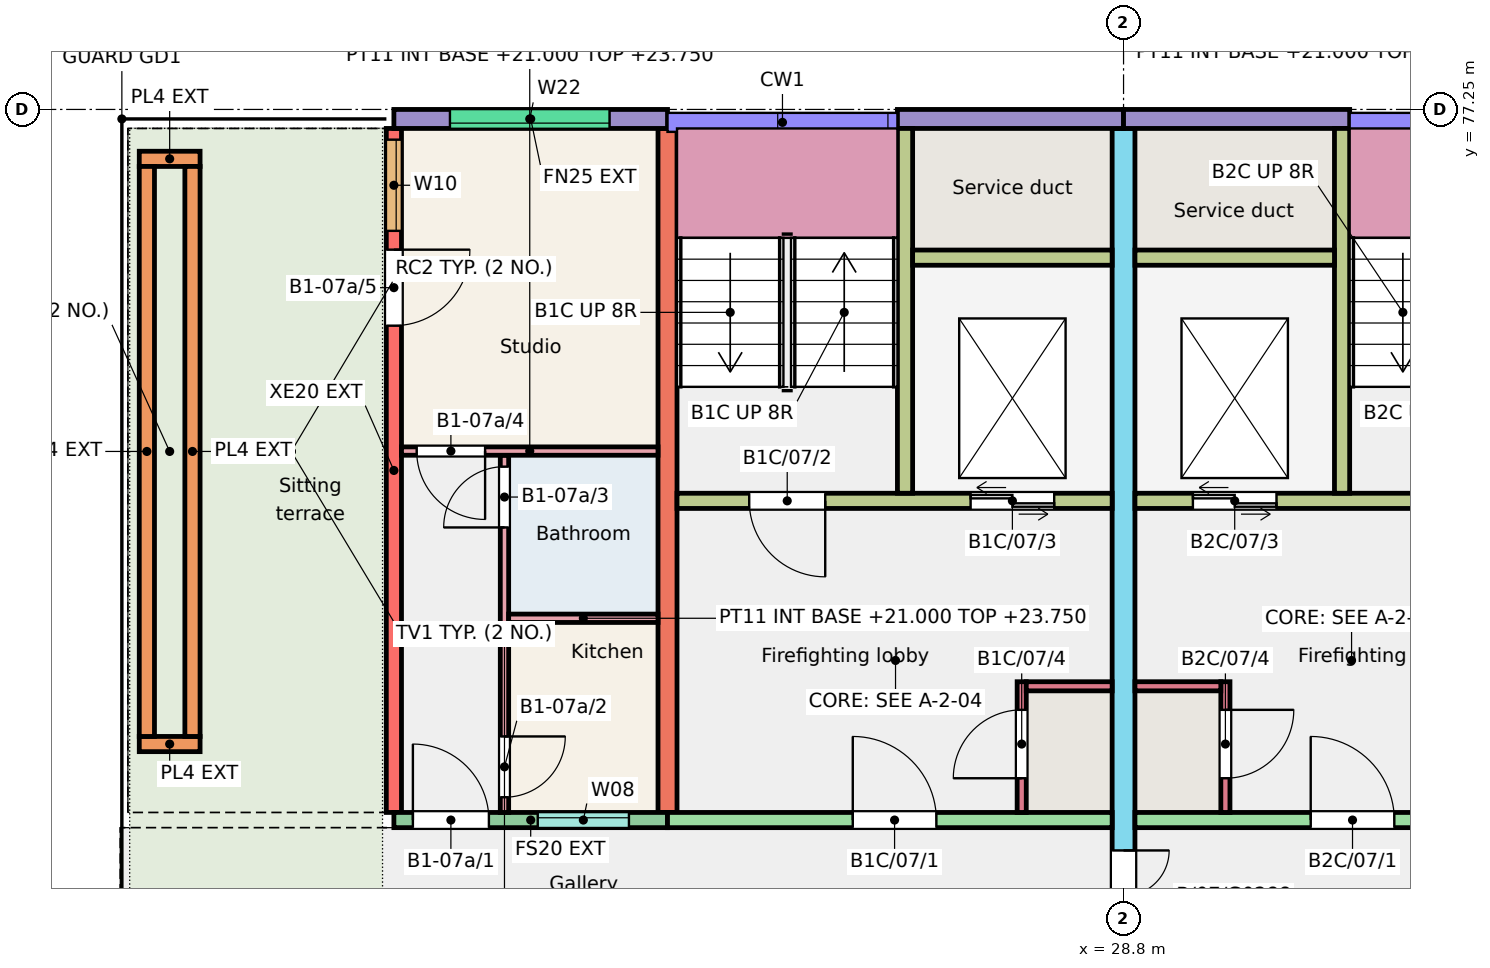
"""IFC4 building model, lengths in metres.
Left out: names, types, materials, properties, quantities, classifications, styles, units other than length and angle.
Written with IfcOpenShell. Run it as: python <this file> out.ifc"""

import sys

from ifc_helpers import new_model, si_unit, direction, frame, frame_2d, origin, place, context, subcontext, project, spatial, rectangle, extrude, element, fill, save


model = new_model("IFC4")
c1 = context("Model", 3, precision=1e-05, world=origin(), true_north=direction((0.0, 1.0)))
c2 = subcontext(c1, "Body", "Model", "MODEL_VIEW")
j1 = project(units=[si_unit("LENGTHUNIT", "METRE"), si_unit("PLANEANGLEUNIT", "RADIAN")], contexts=[c1])
p1 = place(None, origin())
s1 = spatial("IfcSite", under=j1, at=p1, CompositionType="ELEMENT")
p2 = place(p1, origin())
s2 = spatial("IfcBuilding", under=s1, at=p2, CompositionType="ELEMENT")
p3 = place(p2, frame((0.0, 0.0, 21.0)))
s3 = spatial("IfcBuildingStorey", under=s2, at=p3, CompositionType="ELEMENT", Elevation=21.0)
p4 = place(p3, frame((19.2, 68.0, 0.0), z_axis=(0.0, 0.0, 1.0), x_axis=(0.0, 1.0, 0.0)))
e1 = element("IfcWall", 1, at=p4, inside=s3, PredefinedType="SHEAR", context=c2, shape_type="SweptSolid", body=[
    extrude(rectangle(XDim=9.0, YDim=0.2, at=frame_2d((4.5, 0.0))), origin(), (0.0, 0.0, 1.0), 3.0),
])
p5 = place(p4, frame((7.653, 0.0, 0.9)))
e2 = element("IfcOpeningElement", 2, at=p5, cuts=e1, PredefinedType="OPENING", context=c2, shape_type="SweptSolid", body=[
    extrude(rectangle(XDim=1.2, YDim=1.5, at=frame_2d((0.6, 0.75))), frame((0.0, 0.11, 0.0), z_axis=(0.0, -1.0, 0.0), x_axis=(1.0, 0.0, 0.0)), (0.0, 0.0, 1.0), 0.22),
])
p6 = place(p4, frame((6.405, 0.0, 0.0)))
e3 = element("IfcOpeningElement", 3, at=p6, cuts=e1, PredefinedType="OPENING", context=c2, shape_type="SweptSolid", body=[
    extrude(rectangle(XDim=1.0, YDim=2.1, at=frame_2d((0.5, 1.05))), frame((0.0, 0.11, 0.0), z_axis=(0.0, -1.0, 0.0), x_axis=(1.0, 0.0, 0.0)), (0.0, 0.0, 1.0), 0.22),
])
p7 = place(p3, frame((22.8, 68.0, 0.0), z_axis=(0.0, 0.0, 1.0), x_axis=(0.0, 1.0, 0.0)))
e4 = element("IfcWall", 4, at=p7, inside=s3, PredefinedType="SHEAR", context=c2, shape_type="SweptSolid", body=[
    extrude(rectangle(XDim=9.0, YDim=0.25, at=frame_2d((4.5, 0.0))), origin(), (0.0, 0.0, 1.0), 3.0),
])
p8 = place(p3, frame((28.8, 66.0, 0.0), z_axis=(0.0, 0.0, 1.0), x_axis=(0.0, 1.0, 0.0)))
e5 = element("IfcWall", 5, at=p8, inside=s3, PredefinedType="SHEAR", context=c2, shape_type="SweptSolid", body=[
    extrude(rectangle(XDim=11.0, YDim=0.3, at=frame_2d((5.5, 0.0))), origin(), (0.0, 0.0, 1.0), 3.0),
])
p9 = place(p8, frame((0.3, 0.0, 0.0)))
e6 = element("IfcOpeningElement", 6, at=p9, cuts=e5, PredefinedType="OPENING", context=c2, shape_type="SweptSolid", body=[
    extrude(rectangle(XDim=1.2, YDim=2.1, at=frame_2d((0.6, 1.05))), frame((0.0, 0.16, 0.0), z_axis=(0.0, -1.0, 0.0), x_axis=(1.0, 0.0, 0.0)), (0.0, 0.0, 1.0), 0.32),
])
p10 = place(p3, frame((19.2, 77.125, 0.0), z_axis=(0.0, 0.0, 1.0), x_axis=(1.0, 0.0, 0.0)))
e7 = element("IfcWall", 7, at=p10, inside=s3, PredefinedType="SOLIDWALL", context=c2, shape_type="SweptSolid", body=[
    extrude(rectangle(XDim=3.6, YDim=0.25, at=frame_2d((1.8, 0.0))), origin(), (0.0, 0.0, 1.0), 3.0),
])
p11 = place(p10, frame((0.738, 0.0, 1.2)))
e8 = element("IfcOpeningElement", 8, at=p11, cuts=e7, PredefinedType="OPENING", context=c2, shape_type="SweptSolid", body=[
    extrude(rectangle(XDim=2.1, YDim=1.2, at=frame_2d((1.05, 0.6))), frame((0.0, 0.135, 0.0), z_axis=(0.0, -1.0, 0.0), x_axis=(1.0, 0.0, 0.0)), (0.0, 0.0, 1.0), 0.27),
])
p12 = place(p3, frame((19.2, 67.9, 0.0), z_axis=(0.0, 0.0, 1.0), x_axis=(1.0, 0.0, 0.0)))
e9 = element("IfcWall", 9, at=p12, inside=s3, PredefinedType="SOLIDWALL", context=c2, shape_type="SweptSolid", body=[
    extrude(rectangle(XDim=3.6, YDim=0.2, at=frame_2d((1.8, 0.0))), origin(), (0.0, 0.0, 1.0), 3.0),
])
p13 = place(p12, frame((1.893, 0.0, 1.1)))
e10 = element("IfcOpeningElement", 10, at=p13, cuts=e9, PredefinedType="OPENING", context=c2, shape_type="SweptSolid", body=[
    extrude(rectangle(XDim=1.2, YDim=1.3, at=frame_2d((0.6, 0.65))), frame((0.0, 0.11, 0.0), z_axis=(0.0, -1.0, 0.0), x_axis=(1.0, 0.0, 0.0)), (0.0, 0.0, 1.0), 0.22),
])
p14 = place(p12, frame((0.25, 0.0, 0.0)))
e11 = element("IfcOpeningElement", 11, at=p14, cuts=e9, PredefinedType="OPENING", context=c2, shape_type="SweptSolid", body=[
    extrude(rectangle(XDim=1.0, YDim=2.1, at=frame_2d((0.5, 1.05))), frame((0.0, 0.11, 0.0), z_axis=(0.0, -1.0, 0.0), x_axis=(1.0, 0.0, 0.0)), (0.0, 0.0, 1.0), 0.22),
])
p15 = place(p3, frame((25.825, 77.125, 0.0), z_axis=(0.0, 0.0, 1.0), x_axis=(1.0, 0.0, 0.0)))
e12 = element("IfcWall", 12, at=p15, inside=s3, PredefinedType="SOLIDWALL", context=c2, shape_type="SweptSolid", body=[
    extrude(rectangle(XDim=2.975, YDim=0.25, at=frame_2d((1.488, 0.0))), origin(), (0.0, 0.0, 1.0), 3.0),
])
p16 = place(p3, frame((22.8, 67.9, 0.0), z_axis=(0.0, 0.0, 1.0), x_axis=(1.0, 0.0, 0.0)))
e13 = element("IfcWall", 13, at=p16, inside=s3, PredefinedType="SHEAR", context=c2, shape_type="SweptSolid", body=[
    extrude(rectangle(XDim=5.85, YDim=0.2, at=frame_2d((2.925, 0.0))), origin(), (0.0, 0.0, 1.0), 3.0),
])
p17 = place(p16, frame((2.438, 0.0, 0.0)))
e14 = element("IfcOpeningElement", 14, at=p17, cuts=e13, PredefinedType="OPENING", context=c2, shape_type="SweptSolid", body=[
    extrude(rectangle(XDim=1.1, YDim=2.1, at=frame_2d((0.55, 1.05))), frame((0.0, 0.11, 0.0), z_axis=(0.0, -1.0, 0.0), x_axis=(1.0, 0.0, 0.0)), (0.0, 0.0, 1.0), 0.22),
])
p18 = place(p3, frame((22.925, 72.1, 0.0), z_axis=(0.0, 0.0, 1.0), x_axis=(1.0, 0.0, 0.0)))
e15 = element("IfcWall", 15, at=p18, inside=s3, PredefinedType="SHEAR", context=c2, shape_type="SweptSolid", body=[
    extrude(rectangle(XDim=5.725, YDim=0.2, at=frame_2d((2.862, 0.0))), origin(), (0.0, 0.0, 1.0), 3.0),
])
p19 = place(p18, frame((0.95, 0.0, 0.0)))
e16 = element("IfcOpeningElement", 16, at=p19, cuts=e15, PredefinedType="OPENING", context=c2, shape_type="SweptSolid", body=[
    extrude(rectangle(XDim=1.0, YDim=2.1, at=frame_2d((0.5, 1.05))), frame((0.0, 0.11, 0.0), z_axis=(0.0, -1.0, 0.0), x_axis=(1.0, 0.0, 0.0)), (0.0, 0.0, 1.0), 0.22),
])
p20 = place(p18, frame((3.863, 0.0, 0.0)))
e17 = element("IfcOpeningElement", 17, at=p20, cuts=e15, PredefinedType="OPENING", context=c2, shape_type="SweptSolid", body=[
    extrude(rectangle(XDim=1.1, YDim=2.1, at=frame_2d((0.55, 1.05))), frame((0.0, 0.11, 0.0), z_axis=(0.0, -1.0, 0.0), x_axis=(1.0, 0.0, 0.0)), (0.0, 0.0, 1.0), 0.22),
])
p21 = place(p3, frame((25.925, 72.2, 0.0), z_axis=(0.0, 0.0, 1.0), x_axis=(0.0, 1.0, 0.0)))
e18 = element("IfcWall", 18, at=p21, inside=s3, PredefinedType="SHEAR", context=c2, shape_type="SweptSolid", body=[
    extrude(rectangle(XDim=4.8, YDim=0.2, at=frame_2d((2.4, 0.0))), origin(), (0.0, 0.0, 1.0), 3.0),
])
p22 = place(p3, frame((26.025, 75.3, 0.0), z_axis=(0.0, 0.0, 1.0), x_axis=(1.0, 0.0, 0.0)))
e19 = element("IfcWall", 19, at=p22, inside=s3, PredefinedType="SHEAR", context=c2, shape_type="SweptSolid", body=[
    extrude(rectangle(XDim=2.625, YDim=0.2, at=frame_2d((1.312, 0.0))), origin(), (0.0, 0.0, 1.0), 3.0),
])
p23 = place(p3, frame((27.46, 68.0, 0.0), z_axis=(0.0, 0.0, 1.0), x_axis=(0.0, 1.0, 0.0)))
e20 = element("IfcWall", 20, at=p23, inside=s3, PredefinedType="SHEAR", context=c2, shape_type="SweptSolid", body=[
    extrude(rectangle(XDim=1.72, YDim=0.12, at=frame_2d((0.86, 0.0))), origin(), (0.0, 0.0, 1.0), 3.0),
])
p24 = place(p23, frame((0.45, 0.0, 0.0)))
e21 = element("IfcOpeningElement", 21, at=p24, cuts=e20, PredefinedType="OPENING", context=c2, shape_type="SweptSolid", body=[
    extrude(rectangle(XDim=0.9, YDim=2.1, at=frame_2d((0.45, 1.05))), frame((0.0, 0.07, 0.0), z_axis=(0.0, -1.0, 0.0), x_axis=(1.0, 0.0, 0.0)), (0.0, 0.0, 1.0), 0.14),
])
p25 = place(p3, frame((27.52, 69.66, 0.0), z_axis=(0.0, 0.0, 1.0), x_axis=(1.0, 0.0, 0.0)))
e22 = element("IfcWall", 22, at=p25, inside=s3, PredefinedType="SHEAR", context=c2, shape_type="SweptSolid", body=[
    extrude(rectangle(XDim=1.13, YDim=0.12, at=frame_2d((0.565, 0.0))), origin(), (0.0, 0.0, 1.0), 3.0),
])
p26 = place(p3, frame((28.8, 77.125, 0.0), z_axis=(0.0, 0.0, 1.0), x_axis=(1.0, 0.0, 0.0)))
e23 = element("IfcWall", 23, at=p26, inside=s3, PredefinedType="SOLIDWALL", context=c2, shape_type="SweptSolid", body=[
    extrude(rectangle(XDim=2.975, YDim=0.25, at=frame_2d((1.487, 0.0))), origin(), (0.0, 0.0, 1.0), 3.0),
])
p27 = place(p3, frame((28.95, 67.9, 0.0), z_axis=(0.0, 0.0, 1.0), x_axis=(1.0, 0.0, 0.0)))
e24 = element("IfcWall", 24, at=p27, inside=s3, PredefinedType="SHEAR", context=c2, shape_type="SweptSolid", body=[
    extrude(rectangle(XDim=5.85, YDim=0.2, at=frame_2d((2.925, 0.0))), origin(), (0.0, 0.0, 1.0), 3.0),
])
p28 = place(p27, frame((2.312, 0.0, 0.0)))
e25 = element("IfcOpeningElement", 25, at=p28, cuts=e24, PredefinedType="OPENING", context=c2, shape_type="SweptSolid", body=[
    extrude(rectangle(XDim=1.1, YDim=2.1, at=frame_2d((0.55, 1.05))), frame((0.0, 0.11, 0.0), z_axis=(0.0, -1.0, 0.0), x_axis=(1.0, 0.0, 0.0)), (0.0, 0.0, 1.0), 0.22),
])
p29 = place(p3, frame((28.95, 72.1, 0.0), z_axis=(0.0, 0.0, 1.0), x_axis=(1.0, 0.0, 0.0)))
e26 = element("IfcWall", 26, at=p29, inside=s3, PredefinedType="SHEAR", context=c2, shape_type="SweptSolid", body=[
    extrude(rectangle(XDim=5.725, YDim=0.2, at=frame_2d((2.863, 0.0))), origin(), (0.0, 0.0, 1.0), 3.0),
])
p30 = place(p29, frame((3.775, 0.0, 0.0)))
e27 = element("IfcOpeningElement", 27, at=p30, cuts=e26, PredefinedType="OPENING", context=c2, shape_type="SweptSolid", body=[
    extrude(rectangle(XDim=1.0, YDim=2.1, at=frame_2d((0.5, 1.05))), frame((0.0, 0.11, 0.0), z_axis=(0.0, -1.0, 0.0), x_axis=(1.0, 0.0, 0.0)), (0.0, 0.0, 1.0), 0.22),
])
p31 = place(p29, frame((0.762, 0.0, 0.0)))
e28 = element("IfcOpeningElement", 28, at=p31, cuts=e26, PredefinedType="OPENING", context=c2, shape_type="SweptSolid", body=[
    extrude(rectangle(XDim=1.1, YDim=2.1, at=frame_2d((0.55, 1.05))), frame((0.0, 0.11, 0.0), z_axis=(0.0, -1.0, 0.0), x_axis=(1.0, 0.0, 0.0)), (0.0, 0.0, 1.0), 0.22),
])
p32 = place(p3, frame((31.675, 72.2, 0.0), z_axis=(0.0, 0.0, 1.0), x_axis=(0.0, 1.0, 0.0)))
e29 = element("IfcWall", 29, at=p32, inside=s3, PredefinedType="SHEAR", context=c2, shape_type="SweptSolid", body=[
    extrude(rectangle(XDim=4.8, YDim=0.2, at=frame_2d((2.4, 0.0))), origin(), (0.0, 0.0, 1.0), 3.0),
])
p33 = place(p3, frame((28.95, 75.3, 0.0), z_axis=(0.0, 0.0, 1.0), x_axis=(1.0, 0.0, 0.0)))
e30 = element("IfcWall", 30, at=p33, inside=s3, PredefinedType="SHEAR", context=c2, shape_type="SweptSolid", body=[
    extrude(rectangle(XDim=2.625, YDim=0.2, at=frame_2d((1.312, 0.0))), origin(), (0.0, 0.0, 1.0), 3.0),
])
p34 = place(p3, frame((30.14, 68.0, 0.0), z_axis=(0.0, 0.0, 1.0), x_axis=(0.0, 1.0, 0.0)))
e31 = element("IfcWall", 31, at=p34, inside=s3, PredefinedType="SHEAR", context=c2, shape_type="SweptSolid", body=[
    extrude(rectangle(XDim=1.72, YDim=0.12, at=frame_2d((0.86, 0.0))), origin(), (0.0, 0.0, 1.0), 3.0),
])
p35 = place(p34, frame((0.45, 0.0, 0.0)))
e32 = element("IfcOpeningElement", 32, at=p35, cuts=e31, PredefinedType="OPENING", context=c2, shape_type="SweptSolid", body=[
    extrude(rectangle(XDim=0.9, YDim=2.1, at=frame_2d((0.45, 1.05))), frame((0.0, 0.07, 0.0), z_axis=(0.0, -1.0, 0.0), x_axis=(1.0, 0.0, 0.0)), (0.0, 0.0, 1.0), 0.14),
])
p36 = place(p3, frame((28.95, 69.66, 0.0), z_axis=(0.0, 0.0, 1.0), x_axis=(1.0, 0.0, 0.0)))
e33 = element("IfcWall", 33, at=p36, inside=s3, PredefinedType="SHEAR", context=c2, shape_type="SweptSolid", body=[
    extrude(rectangle(XDim=1.13, YDim=0.12, at=frame_2d((0.565, 0.0))), origin(), (0.0, 0.0, 1.0), 3.0),
])
for number, where, z_axis, x_axis in (
    (34, (15.85, 68.9, 0.01), (0.0, 0.0, 1.0), (1.0, 0.0, 0.0)),
    (35, (15.85, 76.6, 0.01), (0.0, 0.0, 1.0), (1.0, 0.0, 0.0)),
):
    element("IfcWall", number, at=place(p3, frame(where, z_axis=z_axis, x_axis=x_axis)), inside=s3, PredefinedType="SOLIDWALL", context=c2, shape_type="SweptSolid", body=[
        extrude(rectangle(XDim=0.8, YDim=0.2, at=frame_2d((0.4, 0.0))), origin(), (0.0, 0.0, 1.0), 0.45),
    ])
for number, where, z_axis, x_axis in (
    (36, (15.95, 69.0, 0.01), (0.0, 0.0, 1.0), (0.0, 1.0, 0.0)),
    (37, (16.55, 69.0, 0.01), (0.0, 0.0, 1.0), (0.0, 1.0, 0.0)),
):
    element("IfcWall", number, at=place(p3, frame(where, z_axis=z_axis, x_axis=x_axis)), inside=s3, PredefinedType="SOLIDWALL", context=c2, shape_type="SweptSolid", body=[
        extrude(rectangle(XDim=7.5, YDim=0.2, at=frame_2d((3.75, 0.0))), origin(), (0.0, 0.0, 1.0), 0.45),
    ])
p37 = place(p3, frame((20.655, 68.0, 0.0), z_axis=(0.0, 0.0, 1.0), x_axis=(0.0, 1.0, 0.0)))
e38 = element("IfcWall", 38, at=p37, inside=s3, PredefinedType="PARTITIONING", context=c2, shape_type="SweptSolid", body=[
    extrude(rectangle(XDim=4.7, YDim=0.11, at=frame_2d((2.35, 0.0))), origin(), (0.0, 0.0, 1.0), 2.75),
])
p38 = place(p37, frame((0.2, 0.0, 0.0)))
e39 = element("IfcOpeningElement", 39, at=p38, cuts=e38, PredefinedType="OPENING", context=c2, shape_type="SweptSolid", body=[
    extrude(rectangle(XDim=0.8, YDim=2.1, at=frame_2d((0.4, 1.05))), frame((0.0, 0.065, 0.0), z_axis=(0.0, -1.0, 0.0), x_axis=(1.0, 0.0, 0.0)), (0.0, 0.0, 1.0), 0.13),
])
p39 = place(p37, frame((3.75, 0.0, 0.0)))
e40 = element("IfcOpeningElement", 40, at=p39, cuts=e38, PredefinedType="OPENING", context=c2, shape_type="SweptSolid", body=[
    extrude(rectangle(XDim=0.8, YDim=2.1, at=frame_2d((0.4, 1.05))), frame((0.0, 0.065, 0.0), z_axis=(0.0, -1.0, 0.0), x_axis=(1.0, 0.0, 0.0)), (0.0, 0.0, 1.0), 0.13),
])
p40 = place(p3, frame((20.71, 70.555, 0.0), z_axis=(0.0, 0.0, 1.0), x_axis=(1.0, 0.0, 0.0)))
e41 = element("IfcWall", 41, at=p40, inside=s3, PredefinedType="PARTITIONING", context=c2, shape_type="SweptSolid", body=[
    extrude(rectangle(XDim=1.965, YDim=0.11, at=frame_2d((0.982, 0.0))), origin(), (0.0, 0.0, 1.0), 2.75),
])
p41 = place(p3, frame((19.3, 72.755, 0.0), z_axis=(0.0, 0.0, 1.0), x_axis=(1.0, 0.0, 0.0)))
e42 = element("IfcWall", 42, at=p41, inside=s3, PredefinedType="PARTITIONING", context=c2, shape_type="SweptSolid", body=[
    extrude(rectangle(XDim=3.375, YDim=0.11, at=frame_2d((1.688, 0.0))), origin(), (0.0, 0.0, 1.0), 2.75),
])
p42 = place(p41, frame((0.2, 0.0, 0.0)))
e43 = element("IfcOpeningElement", 43, at=p42, cuts=e42, PredefinedType="OPENING", context=c2, shape_type="SweptSolid", body=[
    extrude(rectangle(XDim=0.9, YDim=2.1, at=frame_2d((0.45, 1.05))), frame((0.0, 0.065, 0.0), z_axis=(0.0, -1.0, 0.0), x_axis=(1.0, 0.0, 0.0)), (0.0, 0.0, 1.0), 0.13),
])
p43 = place(p13, origin())
e44 = element("IfcWindow", 44, at=p43, inside=s3, PartitioningType="SINGLE_PANEL", PredefinedType="WINDOW", context=c2, shape_type="SweptSolid", body=[
    extrude(rectangle(XDim=1.2, YDim=1.3, at=frame_2d((0.6, 0.65))), frame((0.0, 0.06, 0.0), z_axis=(0.0, -1.0, 0.0), x_axis=(1.0, 0.0, 0.0)), (0.0, 0.0, 1.0), 0.06),
])
fill(e10, e44)
p44 = place(p11, origin())
e45 = element("IfcWindow", 45, at=p44, inside=s3, PartitioningType="SINGLE_PANEL", PredefinedType="WINDOW", context=c2, shape_type="SweptSolid", body=[
    extrude(rectangle(XDim=2.1, YDim=1.2, at=frame_2d((1.05, 0.6))), frame((0.0, -0.025, 0.0), z_axis=(0.0, -1.0, 0.0), x_axis=(1.0, 0.0, 0.0)), (0.0, 0.0, 1.0), 0.06),
])
fill(e8, e45)
p45 = place(p5, origin())
e46 = element("IfcWindow", 46, at=p45, inside=s3, PartitioningType="SINGLE_PANEL", PredefinedType="WINDOW", context=c2, shape_type="SweptSolid", body=[
    extrude(rectangle(XDim=1.2, YDim=1.5, at=frame_2d((0.6, 0.75))), frame((0.0, 0.0, 0.0), z_axis=(0.0, -1.0, 0.0), x_axis=(1.0, 0.0, 0.0)), (0.0, 0.0, 1.0), 0.06),
])
fill(e2, e46)
p46 = place(p14, origin())
e47 = element("IfcDoor", 47, at=p46, inside=s3, OperationType="SINGLE_SWING_LEFT", PredefinedType="DOOR", context=c2, shape_type="SweptSolid", body=[
    extrude(rectangle(XDim=1.0, YDim=2.1, at=frame_2d((0.5, 1.05))), frame((0.0, 0.025, 0.0), z_axis=(0.0, -1.0, 0.0), x_axis=(1.0, 0.0, 0.0)), (0.0, 0.0, 1.0), 0.05),
])
fill(e11, e47)
p47 = place(p38, origin())
e48 = element("IfcDoor", 48, at=p47, inside=s3, OperationType="SINGLE_SWING_RIGHT", PredefinedType="DOOR", context=c2, shape_type="SweptSolid", body=[
    extrude(rectangle(XDim=0.8, YDim=2.1, at=frame_2d((0.4, 1.05))), frame((0.0, 0.025, 0.0), z_axis=(0.0, -1.0, 0.0), x_axis=(1.0, 0.0, 0.0)), (0.0, 0.0, 1.0), 0.05),
])
fill(e39, e48)
p48 = place(p39, origin())
e49 = element("IfcDoor", 49, at=p48, inside=s3, OperationType="SINGLE_SWING_LEFT", PredefinedType="DOOR", context=c2, shape_type="SweptSolid", body=[
    extrude(rectangle(XDim=0.8, YDim=2.1, at=frame_2d((0.4, 1.05))), frame((0.0, 0.025, 0.0), z_axis=(0.0, -1.0, 0.0), x_axis=(1.0, 0.0, 0.0)), (0.0, 0.0, 1.0), 0.05),
])
fill(e40, e49)
p49 = place(p42, origin())
e50 = element("IfcDoor", 50, at=p49, inside=s3, OperationType="SINGLE_SWING_RIGHT", PredefinedType="DOOR", context=c2, shape_type="SweptSolid", body=[
    extrude(rectangle(XDim=0.9, YDim=2.1, at=frame_2d((0.45, 1.05))), frame((0.0, 0.025, 0.0), z_axis=(0.0, -1.0, 0.0), x_axis=(1.0, 0.0, 0.0)), (0.0, 0.0, 1.0), 0.05),
])
fill(e43, e50)
p50 = place(p6, origin())
e51 = element("IfcDoor", 51, at=p50, inside=s3, OperationType="SINGLE_SWING_RIGHT", PredefinedType="DOOR", context=c2, shape_type="SweptSolid", body=[
    extrude(rectangle(XDim=1.0, YDim=2.1, at=frame_2d((0.5, 1.05))), frame((0.0, 0.025, 0.0), z_axis=(0.0, -1.0, 0.0), x_axis=(1.0, 0.0, 0.0)), (0.0, 0.0, 1.0), 0.05),
])
fill(e3, e51)
p51 = place(p17, origin())
e52 = element("IfcDoor", 52, at=p51, inside=s3, OperationType="SINGLE_SWING_LEFT", PredefinedType="DOOR", context=c2, shape_type="SweptSolid", body=[
    extrude(rectangle(XDim=1.1, YDim=2.1, at=frame_2d((0.55, 1.05))), frame((0.0, 0.025, 0.0), z_axis=(0.0, -1.0, 0.0), x_axis=(1.0, 0.0, 0.0)), (0.0, 0.0, 1.0), 0.05),
])
fill(e14, e52)
p52 = place(p19, origin())
e53 = element("IfcDoor", 53, at=p52, inside=s3, OperationType="SINGLE_SWING_RIGHT", PredefinedType="DOOR", context=c2, shape_type="SweptSolid", body=[
    extrude(rectangle(XDim=1.0, YDim=2.1, at=frame_2d((0.5, 1.05))), frame((0.0, 0.025, 0.0), z_axis=(0.0, -1.0, 0.0), x_axis=(1.0, 0.0, 0.0)), (0.0, 0.0, 1.0), 0.05),
])
fill(e16, e53)
p53 = place(p20, origin())
e54 = element("IfcDoor", 54, at=p53, inside=s3, OperationType="DOUBLE_DOOR_SLIDING", PredefinedType="DOOR", context=c2, shape_type="SweptSolid", body=[
    extrude(rectangle(XDim=1.1, YDim=2.1, at=frame_2d((0.55, 1.05))), frame((0.0, 0.025, 0.0), z_axis=(0.0, -1.0, 0.0), x_axis=(1.0, 0.0, 0.0)), (0.0, 0.0, 1.0), 0.05),
])
fill(e17, e54)
p54 = place(p24, origin())
e55 = element("IfcDoor", 55, at=p54, inside=s3, OperationType="SINGLE_SWING_LEFT", PredefinedType="DOOR", context=c2, shape_type="SweptSolid", body=[
    extrude(rectangle(XDim=0.9, YDim=2.1, at=frame_2d((0.45, 1.05))), frame((0.0, 0.025, 0.0), z_axis=(0.0, -1.0, 0.0), x_axis=(1.0, 0.0, 0.0)), (0.0, 0.0, 1.0), 0.05),
])
fill(e21, e55)
p55 = place(p28, origin())
e56 = element("IfcDoor", 56, at=p55, inside=s3, OperationType="SINGLE_SWING_LEFT", PredefinedType="DOOR", context=c2, shape_type="SweptSolid", body=[
    extrude(rectangle(XDim=1.1, YDim=2.1, at=frame_2d((0.55, 1.05))), frame((0.0, 0.025, 0.0), z_axis=(0.0, -1.0, 0.0), x_axis=(1.0, 0.0, 0.0)), (0.0, 0.0, 1.0), 0.05),
])
fill(e25, e56)
p56 = place(p31, origin())
e57 = element("IfcDoor", 57, at=p56, inside=s3, OperationType="DOUBLE_DOOR_SLIDING", PredefinedType="DOOR", context=c2, shape_type="SweptSolid", body=[
    extrude(rectangle(XDim=1.1, YDim=2.1, at=frame_2d((0.55, 1.05))), frame((0.0, 0.025, 0.0), z_axis=(0.0, -1.0, 0.0), x_axis=(1.0, 0.0, 0.0)), (0.0, 0.0, 1.0), 0.05),
])
fill(e28, e57)
p57 = place(p35, origin())
e58 = element("IfcDoor", 58, at=p57, inside=s3, OperationType="SINGLE_SWING_RIGHT", PredefinedType="DOOR", context=c2, shape_type="SweptSolid", body=[
    extrude(rectangle(XDim=0.9, YDim=2.1, at=frame_2d((0.45, 1.05))), frame((0.0, 0.025, 0.0), z_axis=(0.0, -1.0, 0.0), x_axis=(1.0, 0.0, 0.0)), (0.0, 0.0, 1.0), 0.05),
])
fill(e32, e58)
p58 = place(p9, origin())
e59 = element("IfcDoor", 59, at=p58, inside=s3, OperationType="DOUBLE_DOOR_SINGLE_SWING", PredefinedType="DOOR", context=c2, shape_type="SweptSolid", body=[
    extrude(rectangle(XDim=1.2, YDim=2.1, at=frame_2d((0.6, 1.05))), frame((0.0, 0.025, 0.0), z_axis=(0.0, -1.0, 0.0), x_axis=(1.0, 0.0, 0.0)), (0.0, 0.0, 1.0), 0.05),
])
fill(e6, e59)
save(model, sys.argv[1])
